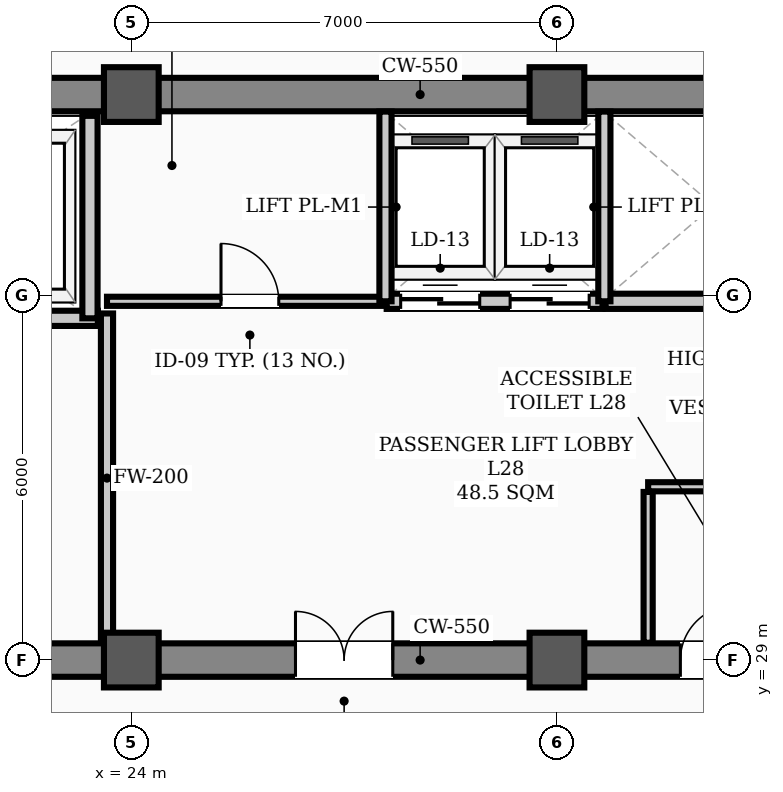
"""IFC4 building model, lengths in metres.
Left out: names, types, materials, properties, quantities, classifications, styles, units other than length and angle.
Written with IfcOpenShell. Run it as: python <this file> out.ifc"""

import sys

from ifc_helpers import new_model, si_unit, direction, frame, frame_2d, origin, origin_2d, place, context, subcontext, project, spatial, rectangle, hollow_rectangle, extrude, element, fill, save


model = new_model("IFC4")
c1 = context("Model", 3, precision=1e-05, world=origin(), true_north=direction((0.0, 1.0)))
c2 = subcontext(c1, "Body", "Model", "MODEL_VIEW")
j1 = project(units=[si_unit("LENGTHUNIT", "METRE"), si_unit("PLANEANGLEUNIT", "RADIAN")], contexts=[c1])
p1 = place(None, origin())
s1 = spatial("IfcSite", under=j1, at=p1, CompositionType="ELEMENT")
p2 = place(p1, origin())
s2 = spatial("IfcBuilding", under=s1, at=p2, CompositionType="ELEMENT")
p3 = place(p2, frame((0.0, 0.0, 114.9)))
s3 = spatial("IfcBuildingStorey", under=s2, at=p3, CompositionType="ELEMENT", Elevation=114.9)
for number, where, z_axis, x_axis in (
    (1, (24.0, 29.0, 0.0), (0.0, 0.0, 1.0), (1.0, 0.0, 0.0)),
    (2, (24.0, 38.3, 0.0), (0.0, 0.0, 1.0), (1.0, 0.0, 0.0)),
    (3, (31.0, 29.0, 0.0), (0.0, 0.0, 1.0), (1.0, 0.0, 0.0)),
    (4, (31.0, 38.3, 0.0), (0.0, 0.0, 1.0), (1.0, 0.0, 0.0)),
):
    element("IfcColumn", number, at=place(p3, frame(where, z_axis=z_axis, x_axis=x_axis)), inside=s3, PredefinedType="COLUMN", context=c2, shape_type="SweptSolid", body=[
        extrude(hollow_rectangle(XDim=0.9, YDim=0.9, WallThickness=0.035, InnerFilletRadius=0.017, OuterFilletRadius=0.052, at=origin_2d()), origin(), (0.0, 0.0, 1.0), 3.9),
    ])
p4 = place(p3, frame((13.5, 29.0, 0.0), z_axis=(0.0, 0.0, 1.0), x_axis=(1.0, 0.0, 0.0)))
e5 = element("IfcWall", 5, at=p4, inside=s3, PredefinedType="SHEAR", context=c2, shape_type="SweptSolid", body=[
    extrude(rectangle(XDim=30.5, YDim=0.55, at=frame_2d((15.25, 0.0))), origin(), (0.0, 0.0, 1.0), 3.72),
])
p5 = place(p4, frame((1.75, 0.0, 0.0)))
e6 = element("IfcOpeningElement", 6, at=p5, cuts=e5, PredefinedType="OPENING", context=c2, shape_type="SweptSolid", body=[
    extrude(rectangle(XDim=1.1, YDim=2.08, at=frame_2d((0.55, 1.04))), frame((0.0, 0.285, 0.0), z_axis=(0.0, -1.0, 0.0), x_axis=(1.0, 0.0, 0.0)), (0.0, 0.0, 1.0), 0.57),
])
p6 = place(p4, frame((26.7, 0.0, 0.0)))
e7 = element("IfcOpeningElement", 7, at=p6, cuts=e5, PredefinedType="OPENING", context=c2, shape_type="SweptSolid", body=[
    extrude(rectangle(XDim=1.1, YDim=2.08, at=frame_2d((0.55, 1.04))), frame((0.0, 0.285, 0.0), z_axis=(0.0, -1.0, 0.0), x_axis=(1.0, 0.0, 0.0)), (0.0, 0.0, 1.0), 0.57),
])
p7 = place(p4, frame((6.8, 0.0, 0.0)))
e8 = element("IfcOpeningElement", 8, at=p7, cuts=e5, PredefinedType="OPENING", context=c2, shape_type="SweptSolid", body=[
    extrude(rectangle(XDim=1.1, YDim=2.08, at=frame_2d((0.55, 1.04))), frame((0.0, 0.285, 0.0), z_axis=(0.0, -1.0, 0.0), x_axis=(1.0, 0.0, 0.0)), (0.0, 0.0, 1.0), 0.57),
])
p8 = place(p4, frame((13.2, 0.0, 0.0)))
e9 = element("IfcOpeningElement", 9, at=p8, cuts=e5, PredefinedType="OPENING", context=c2, shape_type="SweptSolid", body=[
    extrude(rectangle(XDim=1.6, YDim=2.08, at=frame_2d((0.8, 1.04))), frame((0.0, 0.285, 0.0), z_axis=(0.0, -1.0, 0.0), x_axis=(1.0, 0.0, 0.0)), (0.0, 0.0, 1.0), 0.57),
])
p9 = place(p4, frame((19.53, 0.0, 0.0)))
e10 = element("IfcOpeningElement", 10, at=p9, cuts=e5, PredefinedType="OPENING", context=c2, shape_type="SweptSolid", body=[
    extrude(rectangle(XDim=0.9, YDim=2.08, at=frame_2d((0.45, 1.04))), frame((0.0, 0.285, 0.0), z_axis=(0.0, -1.0, 0.0), x_axis=(1.0, 0.0, 0.0)), (0.0, 0.0, 1.0), 0.57),
])
p10 = place(p4, frame((21.57, 0.0, 0.0)))
e11 = element("IfcOpeningElement", 11, at=p10, cuts=e5, PredefinedType="OPENING", context=c2, shape_type="SweptSolid", body=[
    extrude(rectangle(XDim=0.9, YDim=2.08, at=frame_2d((0.45, 1.04))), frame((0.0, 0.285, 0.0), z_axis=(0.0, -1.0, 0.0), x_axis=(1.0, 0.0, 0.0)), (0.0, 0.0, 1.0), 0.57),
])
p11 = place(p3, frame((13.5, 38.3, 0.0), z_axis=(0.0, 0.0, 1.0), x_axis=(1.0, 0.0, 0.0)))
e12 = element("IfcWall", 12, at=p11, inside=s3, PredefinedType="SHEAR", context=c2, shape_type="SweptSolid", body=[
    extrude(rectangle(XDim=30.5, YDim=0.55, at=frame_2d((15.25, 0.0))), origin(), (0.0, 0.0, 1.0), 3.72),
])
p12 = place(p3, frame((18.1, 34.62, 0.0), z_axis=(0.0, 0.0, 1.0), x_axis=(1.0, 0.0, 0.0)))
e13 = element("IfcWall", 13, at=p12, inside=s3, PredefinedType="STANDARD", context=c2, shape_type="SweptSolid", body=[
    extrude(rectangle(XDim=5.35, YDim=0.25, at=frame_2d((2.675, 0.0))), origin(), (0.0, 0.0, 1.0), 3.72),
])
p13 = place(p12, frame((0.85, 0.0, 0.0)))
e14 = element("IfcOpeningElement", 14, at=p13, cuts=e13, PredefinedType="OPENING", context=c2, shape_type="SweptSolid", body=[
    extrude(rectangle(XDim=1.1, YDim=2.08, at=frame_2d((0.55, 1.04))), frame((0.0, 0.135, 0.0), z_axis=(0.0, -1.0, 0.0), x_axis=(1.0, 0.0, 0.0)), (0.0, 0.0, 1.0), 0.27),
])
p14 = place(p12, frame((3.45, 0.0, 0.0)))
e15 = element("IfcOpeningElement", 15, at=p14, cuts=e13, PredefinedType="OPENING", context=c2, shape_type="SweptSolid", body=[
    extrude(rectangle(XDim=1.1, YDim=2.08, at=frame_2d((0.55, 1.04))), frame((0.0, 0.135, 0.0), z_axis=(0.0, -1.0, 0.0), x_axis=(1.0, 0.0, 0.0)), (0.0, 0.0, 1.0), 0.27),
])
p15 = place(p3, frame((23.32, 34.62, 0.0), z_axis=(0.0, 0.0, 1.0), x_axis=(0.0, 1.0, 0.0)))
e16 = element("IfcWall", 16, at=p15, inside=s3, PredefinedType="STANDARD", context=c2, shape_type="SweptSolid", body=[
    extrude(rectangle(XDim=3.33, YDim=0.25, at=frame_2d((1.665, 0.0))), origin(), (0.0, 0.0, 1.0), 3.72),
])
p16 = place(p3, frame((28.2, 34.9, 0.0), z_axis=(0.0, 0.0, 1.0), x_axis=(1.0, 0.0, 0.0)))
e17 = element("IfcWall", 17, at=p16, inside=s3, PredefinedType="STANDARD", context=c2, shape_type="SweptSolid", body=[
    extrude(rectangle(XDim=3.55, YDim=0.25, at=frame_2d((1.775, 0.0))), origin(), (0.0, 0.0, 1.0), 3.72),
])
p17 = place(p16, frame((0.23, 0.0, 0.0)))
e18 = element("IfcOpeningElement", 18, at=p17, cuts=e17, PredefinedType="OPENING", context=c2, shape_type="SweptSolid", body=[
    extrude(rectangle(XDim=1.3, YDim=2.08, at=frame_2d((0.65, 1.04))), frame((0.0, 0.135, 0.0), z_axis=(0.0, -1.0, 0.0), x_axis=(1.0, 0.0, 0.0)), (0.0, 0.0, 1.0), 0.27),
])
p18 = place(p16, frame((2.03, 0.0, 0.0)))
e19 = element("IfcOpeningElement", 19, at=p18, cuts=e17, PredefinedType="OPENING", context=c2, shape_type="SweptSolid", body=[
    extrude(rectangle(XDim=1.3, YDim=2.08, at=frame_2d((0.65, 1.04))), frame((0.0, 0.135, 0.0), z_axis=(0.0, -1.0, 0.0), x_axis=(1.0, 0.0, 0.0)), (0.0, 0.0, 1.0), 0.27),
])
p19 = place(p3, frame((31.8, 34.9, 0.0), z_axis=(0.0, 0.0, 1.0), x_axis=(1.0, 0.0, 0.0)))
e20 = element("IfcWall", 20, at=p19, inside=s3, PredefinedType="STANDARD", context=c2, shape_type="SweptSolid", body=[
    extrude(rectangle(XDim=3.6, YDim=0.25, at=frame_2d((1.8, 0.0))), origin(), (0.0, 0.0, 1.0), 3.72),
])
p20 = place(p3, frame((23.6, 34.9, 0.0), z_axis=(0.0, 0.0, 1.0), x_axis=(1.0, 0.0, 0.0)))
e21 = element("IfcWall", 21, at=p20, inside=s3, PredefinedType="PARTITIONING", context=c2, shape_type="SweptSolid", body=[
    extrude(rectangle(XDim=4.58, YDim=0.15, at=frame_2d((2.29, 0.0))), origin(), (0.0, 0.0, 1.0), 3.72),
])
p21 = place(p20, frame((1.875, 0.0, 0.0)))
e22 = element("IfcOpeningElement", 22, at=p21, cuts=e21, PredefinedType="OPENING", context=c2, shape_type="SweptSolid", body=[
    extrude(rectangle(XDim=0.95, YDim=2.08, at=frame_2d((0.475, 1.04))), frame((0.0, 0.085, 0.0), z_axis=(0.0, -1.0, 0.0), x_axis=(1.0, 0.0, 0.0)), (0.0, 0.0, 1.0), 0.17),
])
p22 = place(p3, frame((32.5, 31.85, 0.0), z_axis=(0.0, 0.0, 1.0), x_axis=(1.0, 0.0, 0.0)))
e23 = element("IfcWall", 23, at=p22, inside=s3, PredefinedType="PARTITIONING", context=c2, shape_type="SweptSolid", body=[
    extrude(rectangle(XDim=4.1, YDim=0.15, at=frame_2d((2.05, 0.0))), origin(), (0.0, 0.0, 1.0), 3.72),
])
p23 = place(p3, frame((23.6, 29.285, 0.0), z_axis=(0.0, 0.0, 1.0), x_axis=(0.0, 1.0, 0.0)))
e24 = element("IfcWall", 24, at=p23, inside=s3, PredefinedType="STANDARD", context=c2, shape_type="SweptSolid", body=[
    extrude(rectangle(XDim=5.415, YDim=0.2, at=frame_2d((2.708, 0.0))), origin(), (0.0, 0.0, 1.0), 3.1),
])
p24 = place(p3, frame((32.5, 29.285, 0.0), z_axis=(0.0, 0.0, 1.0), x_axis=(0.0, 1.0, 0.0)))
e25 = element("IfcWall", 25, at=p24, inside=s3, PredefinedType="PARTITIONING", context=c2, shape_type="SweptSolid", body=[
    extrude(rectangle(XDim=2.48, YDim=0.15, at=frame_2d((1.24, 0.0))), origin(), (0.0, 0.0, 1.0), 3.3),
])
for number, where, z_axis, x_axis in (
    (26, (28.18, 34.9, 0.0), (0.0, 0.0, 1.0), (0.0, 1.0, 0.0)),
    (27, (31.78, 34.9, 0.0), (0.0, 0.0, 1.0), (0.0, 1.0, 0.0)),
):
    element("IfcWall", number, at=place(p3, frame(where, z_axis=z_axis, x_axis=x_axis)), inside=s3, PredefinedType="STANDARD", context=c2, shape_type="SweptSolid", body=[
        extrude(rectangle(XDim=3.12, YDim=0.2, at=frame_2d((1.56, 0.0))), origin(), (0.0, 0.0, 1.0), 3.72),
    ])
p25 = place(p8, origin())
e28 = element("IfcDoor", 28, at=p25, inside=s3, OperationType="DOUBLE_DOOR_SINGLE_SWING", PredefinedType="DOOR", context=c2, shape_type="SweptSolid", body=[
    extrude(rectangle(XDim=1.6, YDim=2.08, at=frame_2d((0.8, 1.04))), frame((0.0, 0.025, 0.0), z_axis=(0.0, -1.0, 0.0), x_axis=(1.0, 0.0, 0.0)), (0.0, 0.0, 1.0), 0.05),
])
fill(e9, e28)
p26 = place(p21, origin())
e29 = element("IfcDoor", 29, at=p26, inside=s3, OperationType="SINGLE_SWING_LEFT", PredefinedType="DOOR", context=c2, shape_type="SweptSolid", body=[
    extrude(rectangle(XDim=0.95, YDim=2.08, at=frame_2d((0.475, 1.04))), frame((0.0, 0.025, 0.0), z_axis=(0.0, -1.0, 0.0), x_axis=(1.0, 0.0, 0.0)), (0.0, 0.0, 1.0), 0.05),
])
fill(e22, e29)
p27 = place(p9, origin())
e30 = element("IfcDoor", 30, at=p27, inside=s3, OperationType="SINGLE_SWING_RIGHT", PredefinedType="DOOR", context=c2, shape_type="SweptSolid", body=[
    extrude(rectangle(XDim=0.9, YDim=2.08, at=frame_2d((0.45, 1.04))), frame((0.0, 0.025, 0.0), z_axis=(0.0, -1.0, 0.0), x_axis=(1.0, 0.0, 0.0)), (0.0, 0.0, 1.0), 0.05),
])
fill(e10, e30)
p28 = place(p17, origin())
e31 = element("IfcDoor", 31, at=p28, inside=s3, OperationType="DOUBLE_DOOR_SLIDING", PredefinedType="DOOR", context=c2, shape_type="SweptSolid", body=[
    extrude(rectangle(XDim=1.3, YDim=2.08, at=frame_2d((0.65, 1.04))), frame((0.0, 0.025, 0.0), z_axis=(0.0, -1.0, 0.0), x_axis=(1.0, 0.0, 0.0)), (0.0, 0.0, 1.0), 0.05),
])
fill(e18, e31)
p29 = place(p18, origin())
e32 = element("IfcDoor", 32, at=p29, inside=s3, OperationType="DOUBLE_DOOR_SLIDING", PredefinedType="DOOR", context=c2, shape_type="SweptSolid", body=[
    extrude(rectangle(XDim=1.3, YDim=2.08, at=frame_2d((0.65, 1.04))), frame((0.0, 0.025, 0.0), z_axis=(0.0, -1.0, 0.0), x_axis=(1.0, 0.0, 0.0)), (0.0, 0.0, 1.0), 0.05),
])
fill(e19, e32)
save(model, sys.argv[1])
